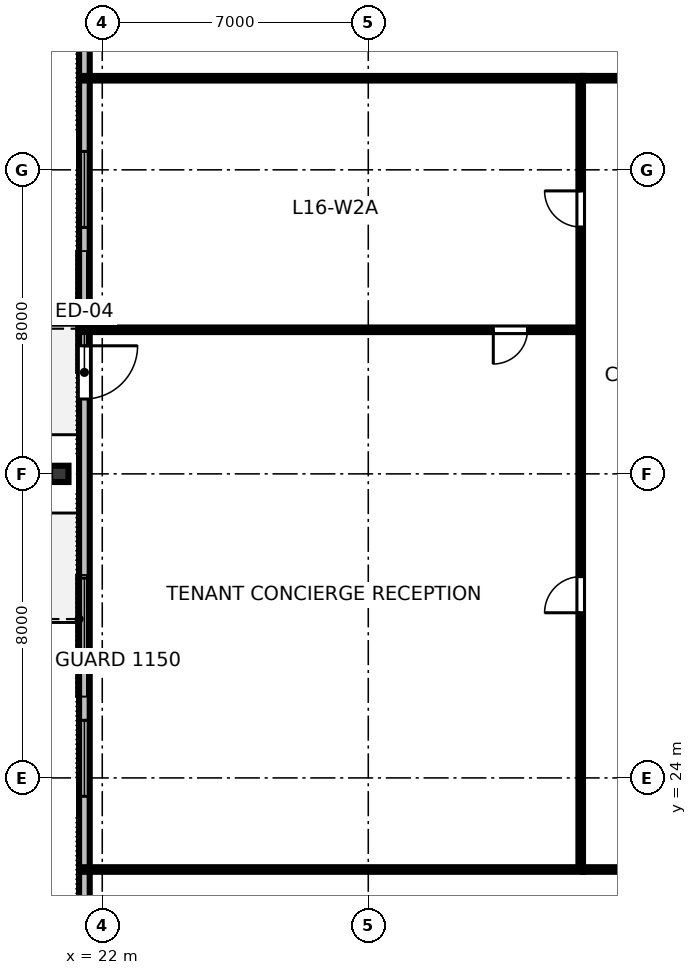
"""IFC4 building model, lengths in metres.
Left out: names, types, materials, properties, quantities, classifications, styles, units other than length and angle.
Written with IfcOpenShell. Run it as: python <this file> out.ifc"""

import sys

from ifc_helpers import new_model, si_unit, direction, frame, frame_2d, origin, origin_2d, place, context, subcontext, project, spatial, rectangle, i_section, extrude, element, fill, save


model = new_model("IFC4")
c1 = context("Model", 3, precision=1e-05, world=origin(), true_north=direction((0.0, 1.0)))
c2 = subcontext(c1, "Body", "Model", "MODEL_VIEW")
j1 = project(units=[si_unit("LENGTHUNIT", "METRE"), si_unit("PLANEANGLEUNIT", "RADIAN")], contexts=[c1])
p1 = place(None, origin())
s1 = spatial("IfcSite", under=j1, at=p1, CompositionType="ELEMENT")
p2 = place(p1, origin())
s2 = spatial("IfcBuilding", under=s1, at=p2, CompositionType="ELEMENT")
p3 = place(p2, frame((0.0, 0.0, 64.0)))
s3 = spatial("IfcBuildingStorey", under=s2, at=p3, CompositionType="ELEMENT", Elevation=64.0)
p4 = place(p3, frame((20.87, 32.0, 0.0), z_axis=(0.0, 0.0, 1.0), x_axis=(0.0, 1.0, 0.0)))
e1 = element("IfcColumn", 1, at=p4, inside=s3, PredefinedType="COLUMN", context=c2, shape_type="SweptSolid", body=[
    extrude(i_section(OverallWidth=0.428, OverallDepth=0.483, WebThickness=0.051, FlangeThickness=0.082, FilletRadius=0.025, at=origin_2d()), origin(), (0.0, 0.0, 1.0), 3.358),
])
p5 = place(p3, frame((21.53, 49.94, 0.0), z_axis=(0.0, 0.0, 1.0), x_axis=(0.0, -1.0, 0.0)))
e2 = element("IfcWall", 2, at=p5, inside=s3, PredefinedType="STANDARD", context=c2, shape_type="SweptSolid", body=[
    extrude(rectangle(XDim=35.88, YDim=0.28, at=frame_2d((17.94, 0.0))), origin(), (0.0, 0.0, 1.0), 3.36),
])
p6 = place(p5, frame((14.57, 0.0, 0.0)))
e3 = element("IfcOpeningElement", 3, at=p6, cuts=e2, PredefinedType="OPENING", context=c2, shape_type="SweptSolid", body=[
    extrude(rectangle(XDim=1.4, YDim=2.15, at=frame_2d((0.7, 1.075))), frame((0.0, 0.15, 0.0), z_axis=(0.0, -1.0, 0.0), x_axis=(1.0, 0.0, 0.0)), (0.0, 0.0, 1.0), 0.3),
])
p7 = place(p5, frame((1.971, 0.0, 0.8)))
e4 = element("IfcOpeningElement", 4, at=p7, cuts=e2, PredefinedType="OPENING", context=c2, shape_type="SweptSolid", body=[
    extrude(rectangle(XDim=2.0, YDim=1.95, at=frame_2d((1.0, 0.975))), frame((0.0, 0.15, 0.0), z_axis=(0.0, -1.0, 0.0), x_axis=(1.0, 0.0, 0.0)), (0.0, 0.0, 1.0), 0.3),
])
p8 = place(p5, frame((9.456, 0.0, 0.8)))
e5 = element("IfcOpeningElement", 5, at=p8, cuts=e2, PredefinedType="OPENING", context=c2, shape_type="SweptSolid", body=[
    extrude(rectangle(XDim=2.0, YDim=1.95, at=frame_2d((1.0, 0.975))), frame((0.0, 0.15, 0.0), z_axis=(0.0, -1.0, 0.0), x_axis=(1.0, 0.0, 0.0)), (0.0, 0.0, 1.0), 0.3),
])
p9 = place(p5, frame((20.682, 0.0, 0.8)))
e6 = element("IfcOpeningElement", 6, at=p9, cuts=e2, PredefinedType="OPENING", context=c2, shape_type="SweptSolid", body=[
    extrude(rectangle(XDim=2.0, YDim=1.95, at=frame_2d((1.0, 0.975))), frame((0.0, 0.15, 0.0), z_axis=(0.0, -1.0, 0.0), x_axis=(1.0, 0.0, 0.0)), (0.0, 0.0, 1.0), 0.3),
])
p10 = place(p5, frame((24.424, 0.0, 0.8)))
e7 = element("IfcOpeningElement", 7, at=p10, cuts=e2, PredefinedType="OPENING", context=c2, shape_type="SweptSolid", body=[
    extrude(rectangle(XDim=2.0, YDim=1.95, at=frame_2d((1.0, 0.975))), frame((0.0, 0.15, 0.0), z_axis=(0.0, -1.0, 0.0), x_axis=(1.0, 0.0, 0.0)), (0.0, 0.0, 1.0), 0.3),
])
p11 = place(p5, frame((31.909, 0.0, 0.8)))
e8 = element("IfcOpeningElement", 8, at=p11, cuts=e2, PredefinedType="OPENING", context=c2, shape_type="SweptSolid", body=[
    extrude(rectangle(XDim=2.0, YDim=1.95, at=frame_2d((1.0, 0.975))), frame((0.0, 0.15, 0.0), z_axis=(0.0, -1.0, 0.0), x_axis=(1.0, 0.0, 0.0)), (0.0, 0.0, 1.0), 0.3),
])
p12 = place(p3, frame((34.65, 21.59, 0.0), z_axis=(0.0, 0.0, 1.0), x_axis=(1.0, 0.0, 0.0)))
e9 = element("IfcWall", 9, at=p12, inside=s3, PredefinedType="PARTITIONING", context=c2, shape_type="SweptSolid", body=[
    extrude(rectangle(XDim=22.7, YDim=0.12, at=frame_2d((11.35, 0.0))), origin(), (0.0, 0.0, 1.0), 2.64),
])
p13 = place(p12, frame((3.365, 0.0, 0.0)))
e10 = element("IfcOpeningElement", 10, at=p13, cuts=e9, PredefinedType="OPENING", context=c2, shape_type="SweptSolid", body=[
    extrude(rectangle(XDim=0.95, YDim=2.15, at=frame_2d((0.475, 1.075))), frame((0.0, 0.07, 0.0), z_axis=(0.0, -1.0, 0.0), x_axis=(1.0, 0.0, 0.0)), (0.0, 0.0, 1.0), 0.14),
])
p14 = place(p12, frame((8.718, 0.0, 0.0)))
e11 = element("IfcOpeningElement", 11, at=p14, cuts=e9, PredefinedType="OPENING", context=c2, shape_type="SweptSolid", body=[
    extrude(rectangle(XDim=0.95, YDim=2.15, at=frame_2d((0.475, 1.075))), frame((0.0, 0.07, 0.0), z_axis=(0.0, -1.0, 0.0), x_axis=(1.0, 0.0, 0.0)), (0.0, 0.0, 1.0), 0.14),
])
p15 = place(p12, frame((13.651, 0.0, 0.0)))
e12 = element("IfcOpeningElement", 12, at=p15, cuts=e9, PredefinedType="OPENING", context=c2, shape_type="SweptSolid", body=[
    extrude(rectangle(XDim=0.95, YDim=2.15, at=frame_2d((0.475, 1.075))), frame((0.0, 0.07, 0.0), z_axis=(0.0, -1.0, 0.0), x_axis=(1.0, 0.0, 0.0)), (0.0, 0.0, 1.0), 0.14),
])
p16 = place(p12, frame((19.509, 0.0, 0.0)))
e13 = element("IfcOpeningElement", 13, at=p16, cuts=e9, PredefinedType="OPENING", context=c2, shape_type="SweptSolid", body=[
    extrude(rectangle(XDim=0.95, YDim=2.15, at=frame_2d((0.475, 1.075))), frame((0.0, 0.07, 0.0), z_axis=(0.0, -1.0, 0.0), x_axis=(1.0, 0.0, 0.0)), (0.0, 0.0, 1.0), 0.14),
])
p17 = place(p3, frame((34.65, 42.41, 0.0), z_axis=(0.0, 0.0, 1.0), x_axis=(1.0, 0.0, 0.0)))
e14 = element("IfcWall", 14, at=p17, inside=s3, PredefinedType="PARTITIONING", context=c2, shape_type="SweptSolid", body=[
    extrude(rectangle(XDim=22.7, YDim=0.12, at=frame_2d((11.35, 0.0))), origin(), (0.0, 0.0, 1.0), 2.64),
])
p18 = place(p17, frame((2.59, 0.0, 0.0)))
e15 = element("IfcOpeningElement", 15, at=p18, cuts=e14, PredefinedType="OPENING", context=c2, shape_type="SweptSolid", body=[
    extrude(rectangle(XDim=0.95, YDim=2.15, at=frame_2d((0.475, 1.075))), frame((0.0, 0.07, 0.0), z_axis=(0.0, -1.0, 0.0), x_axis=(1.0, 0.0, 0.0)), (0.0, 0.0, 1.0), 0.14),
])
p19 = place(p17, frame((8.768, 0.0, 0.0)))
e16 = element("IfcOpeningElement", 16, at=p19, cuts=e14, PredefinedType="OPENING", context=c2, shape_type="SweptSolid", body=[
    extrude(rectangle(XDim=0.95, YDim=2.15, at=frame_2d((0.475, 1.075))), frame((0.0, 0.07, 0.0), z_axis=(0.0, -1.0, 0.0), x_axis=(1.0, 0.0, 0.0)), (0.0, 0.0, 1.0), 0.14),
])
p20 = place(p17, frame((14.079, 0.0, 0.0)))
e17 = element("IfcOpeningElement", 17, at=p20, cuts=e14, PredefinedType="OPENING", context=c2, shape_type="SweptSolid", body=[
    extrude(rectangle(XDim=0.95, YDim=2.15, at=frame_2d((0.475, 1.075))), frame((0.0, 0.07, 0.0), z_axis=(0.0, -1.0, 0.0), x_axis=(1.0, 0.0, 0.0)), (0.0, 0.0, 1.0), 0.14),
])
p21 = place(p17, frame((19.11, 0.0, 0.0)))
e18 = element("IfcOpeningElement", 18, at=p21, cuts=e14, PredefinedType="OPENING", context=c2, shape_type="SweptSolid", body=[
    extrude(rectangle(XDim=0.95, YDim=2.15, at=frame_2d((0.475, 1.075))), frame((0.0, 0.07, 0.0), z_axis=(0.0, -1.0, 0.0), x_axis=(1.0, 0.0, 0.0)), (0.0, 0.0, 1.0), 0.14),
])
p22 = place(p3, frame((34.59, 35.791, 0.0), z_axis=(0.0, 0.0, 1.0), x_axis=(-1.0, 0.0, 0.0)))
e19 = element("IfcWall", 19, at=p22, inside=s3, PredefinedType="PARTITIONING", context=c2, shape_type="SweptSolid", body=[
    extrude(rectangle(XDim=13.06, YDim=0.12, at=frame_2d((6.53, 0.0))), origin(), (0.0, 0.0, 1.0), 2.64),
])
p23 = place(p22, frame((1.4, 0.0, 0.0)))
e20 = element("IfcOpeningElement", 20, at=p23, cuts=e19, PredefinedType="OPENING", context=c2, shape_type="SweptSolid", body=[
    extrude(rectangle(XDim=0.9, YDim=2.15, at=frame_2d((0.45, 1.075))), frame((0.0, 0.07, 0.0), z_axis=(0.0, -1.0, 0.0), x_axis=(1.0, 0.0, 0.0)), (0.0, 0.0, 1.0), 0.14),
])
p24 = place(p3, frame((34.59, 21.65, 0.0), z_axis=(0.0, 0.0, 1.0), x_axis=(0.0, 1.0, 0.0)))
e21 = element("IfcWall", 21, at=p24, inside=s3, PredefinedType="PARTITIONING", context=c2, shape_type="SweptSolid", body=[
    extrude(rectangle(XDim=20.7, YDim=0.12, at=frame_2d((10.35, 0.0))), origin(), (0.0, 0.0, 1.0), 2.64),
])
p25 = place(p24, frame((6.696, 0.0, 0.0)))
e22 = element("IfcOpeningElement", 22, at=p25, cuts=e21, PredefinedType="OPENING", context=c2, shape_type="SweptSolid", body=[
    extrude(rectangle(XDim=0.95, YDim=2.15, at=frame_2d((0.475, 1.075))), frame((0.0, 0.07, 0.0), z_axis=(0.0, -1.0, 0.0), x_axis=(1.0, 0.0, 0.0)), (0.0, 0.0, 1.0), 0.14),
])
p26 = place(p24, frame((16.846, 0.0, 0.0)))
e23 = element("IfcOpeningElement", 23, at=p26, cuts=e21, PredefinedType="OPENING", context=c2, shape_type="SweptSolid", body=[
    extrude(rectangle(XDim=0.95, YDim=2.15, at=frame_2d((0.475, 1.075))), frame((0.0, 0.07, 0.0), z_axis=(0.0, -1.0, 0.0), x_axis=(1.0, 0.0, 0.0)), (0.0, 0.0, 1.0), 0.14),
])
for number, where, z_axis, x_axis in (
    (24, (34.65, 21.59, 0.0), (0.0, 0.0, 1.0), (-1.0, 0.0, 0.0)),
    (25, (34.65, 42.41, 0.0), (0.0, 0.0, 1.0), (-1.0, 0.0, 0.0)),
):
    element("IfcWall", number, at=place(p3, frame(where, z_axis=z_axis, x_axis=x_axis)), inside=s3, PredefinedType="PARTITIONING", context=c2, shape_type="SweptSolid", body=[
        extrude(rectangle(XDim=13.12, YDim=0.12, at=frame_2d((6.56, 0.0))), origin(), (0.0, 0.0, 1.0), 2.64),
    ])
p27 = place(p6, origin())
e26 = element("IfcDoor", 26, at=p27, inside=s3, OperationType="SINGLE_SWING_LEFT", PredefinedType="DOOR", context=c2, shape_type="SweptSolid", body=[
    extrude(rectangle(XDim=1.4, YDim=2.15, at=frame_2d((0.7, 1.075))), frame((0.0, 0.025, 0.0), z_axis=(0.0, -1.0, 0.0), x_axis=(1.0, 0.0, 0.0)), (0.0, 0.0, 1.0), 0.05),
])
fill(e3, e26)
p28 = place(p8, origin())
e27 = element("IfcWindow", 27, at=p28, inside=s3, PartitioningType="SINGLE_PANEL", PredefinedType="WINDOW", context=c2, shape_type="SweptSolid", body=[
    extrude(rectangle(XDim=2.0, YDim=1.95, at=frame_2d((1.0, 0.975))), frame((0.0, 0.03, 0.0), z_axis=(0.0, -1.0, 0.0), x_axis=(1.0, 0.0, 0.0)), (0.0, 0.0, 1.0), 0.06),
])
fill(e5, e27)
p29 = place(p9, origin())
e28 = element("IfcWindow", 28, at=p29, inside=s3, PartitioningType="SINGLE_PANEL", PredefinedType="WINDOW", context=c2, shape_type="SweptSolid", body=[
    extrude(rectangle(XDim=2.0, YDim=1.95, at=frame_2d((1.0, 0.975))), frame((0.0, 0.03, 0.0), z_axis=(0.0, -1.0, 0.0), x_axis=(1.0, 0.0, 0.0)), (0.0, 0.0, 1.0), 0.06),
])
fill(e6, e28)
p30 = place(p10, origin())
e29 = element("IfcWindow", 29, at=p30, inside=s3, PartitioningType="SINGLE_PANEL", PredefinedType="WINDOW", context=c2, shape_type="SweptSolid", body=[
    extrude(rectangle(XDim=2.0, YDim=1.95, at=frame_2d((1.0, 0.975))), frame((0.0, 0.03, 0.0), z_axis=(0.0, -1.0, 0.0), x_axis=(1.0, 0.0, 0.0)), (0.0, 0.0, 1.0), 0.06),
])
fill(e7, e29)
p31 = place(p23, origin())
e30 = element("IfcDoor", 30, at=p31, inside=s3, OperationType="SINGLE_SWING_RIGHT", PredefinedType="DOOR", context=c2, shape_type="SweptSolid", body=[
    extrude(rectangle(XDim=0.9, YDim=2.15, at=frame_2d((0.45, 1.075))), frame((0.0, 0.025, 0.0), z_axis=(0.0, -1.0, 0.0), x_axis=(1.0, 0.0, 0.0)), (0.0, 0.0, 1.0), 0.05),
])
fill(e20, e30)
p32 = place(p25, origin())
e31 = element("IfcDoor", 31, at=p32, inside=s3, OperationType="SINGLE_SWING_LEFT", PredefinedType="DOOR", context=c2, shape_type="SweptSolid", body=[
    extrude(rectangle(XDim=0.95, YDim=2.15, at=frame_2d((0.475, 1.075))), frame((0.0, 0.025, 0.0), z_axis=(0.0, -1.0, 0.0), x_axis=(1.0, 0.0, 0.0)), (0.0, 0.0, 1.0), 0.05),
])
fill(e22, e31)
p33 = place(p26, origin())
e32 = element("IfcDoor", 32, at=p33, inside=s3, OperationType="SINGLE_SWING_RIGHT", PredefinedType="DOOR", context=c2, shape_type="SweptSolid", body=[
    extrude(rectangle(XDim=0.95, YDim=2.15, at=frame_2d((0.475, 1.075))), frame((0.0, 0.025, 0.0), z_axis=(0.0, -1.0, 0.0), x_axis=(1.0, 0.0, 0.0)), (0.0, 0.0, 1.0), 0.05),
])
fill(e23, e32)
save(model, sys.argv[1])
